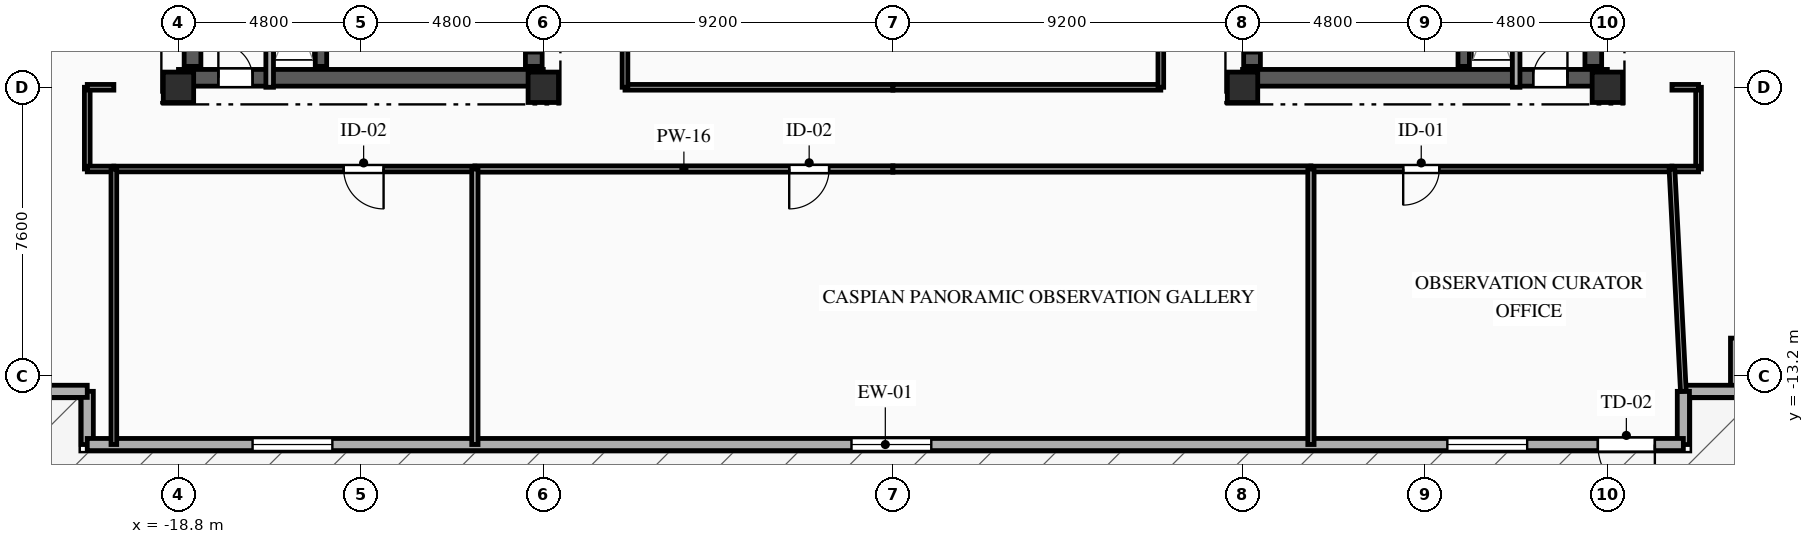
"""IFC4 building model, lengths in metres.
Left out: names, types, materials, properties, quantities, classifications, styles, units other than length and angle.
Written with IfcOpenShell. Run it as: python <this file> out.ifc"""

import sys

from ifc_helpers import new_model, si_unit, direction, frame, frame_2d, origin, origin_2d, place, context, subcontext, project, spatial, rectangle, extrude, element, fill, save


model = new_model("IFC4")
c1 = context("Model", 3, precision=1e-05, world=origin(), true_north=direction((0.0, 1.0)))
c2 = subcontext(c1, "Body", "Model", "MODEL_VIEW")
j1 = project(units=[si_unit("LENGTHUNIT", "METRE"), si_unit("PLANEANGLEUNIT", "RADIAN")], contexts=[c1])
p1 = place(None, origin())
s1 = spatial("IfcSite", under=j1, at=p1, CompositionType="ELEMENT")
p2 = place(p1, origin())
s2 = spatial("IfcBuilding", under=s1, at=p2, CompositionType="ELEMENT")
p3 = place(p2, frame((0.0, 0.0, 261.8)))
s3 = spatial("IfcBuildingStorey", under=s2, at=p3, CompositionType="ELEMENT", Elevation=261.8)
for number, where, z_axis, x_axis in (
    (1, (-18.8, -5.6, 0.0), (0.0, 0.0, 1.0), (1.0, 0.0, 0.0)),
    (2, (-9.2, -5.6, 0.0), (0.0, 0.0, 1.0), (1.0, 0.0, 0.0)),
    (3, (9.2, -5.6, 0.0), (0.0, 0.0, 1.0), (1.0, 0.0, 0.0)),
    (4, (18.8, -5.6, 0.0), (0.0, 0.0, 1.0), (1.0, 0.0, 0.0)),
):
    element("IfcColumn", number, at=place(p3, frame(where, z_axis=z_axis, x_axis=x_axis)), inside=s3, PredefinedType="COLUMN", context=c2, shape_type="SweptSolid", body=[
        extrude(rectangle(XDim=0.8, YDim=0.8, at=origin_2d()), origin(), (0.0, 0.0, 1.0), 4.2),
    ])
p4 = place(p3, frame((-21.2, -15.0, 0.0), z_axis=(0.0, 0.0, 1.0), x_axis=(0.0, 1.0, 0.0)))
e5 = element("IfcWall", 5, at=p4, inside=s3, PredefinedType="SOLIDWALL", context=c2, shape_type="SweptSolid", body=[
    extrude(rectangle(XDim=1.4, YDim=0.32, at=frame_2d((0.7, 0.0))), origin(), (0.0, 0.0, 1.0), 3.78),
])
for number, where, z_axis, x_axis in (
    (6, (-21.2, -13.6, 0.0), (0.0, 0.0, 1.0), (-1.0, 0.0, 0.0)),
    (7, (22.2, -12.2, 0.0), (0.0, 0.0, 1.0), (0.0, -1.0, 0.0)),
):
    element("IfcWall", number, at=place(p3, frame(where, z_axis=z_axis, x_axis=x_axis)), inside=s3, PredefinedType="SOLIDWALL", context=c2, shape_type="SweptSolid", body=[
        extrude(rectangle(XDim=1.4, YDim=0.32, at=frame_2d((0.7, 0.0))), origin(), (0.0, 0.0, 1.0), 3.78),
    ])
for number, where, z_axis, x_axis in (
    (8, (22.2, -13.6, 0.0), (0.0, 0.0, 1.0), (-1.0, 0.0, 0.0)),
    (9, (20.8, -13.6, 0.0), (0.0, 0.0, 1.0), (0.0, -1.0, 0.0)),
):
    element("IfcWall", number, at=place(p3, frame(where, z_axis=z_axis, x_axis=x_axis)), inside=s3, PredefinedType="SOLIDWALL", context=c2, shape_type="SweptSolid", body=[
        extrude(rectangle(XDim=1.4, YDim=0.32, at=frame_2d((0.7, 0.0))), origin(), (0.0, 0.0, 1.0), 3.78),
    ])
p5 = place(p3, frame((20.8, -15.0, 0.0), z_axis=(0.0, 0.0, 1.0), x_axis=(-1.0, 0.0, 0.0)))
e10 = element("IfcWall", 10, at=p5, inside=s3, PredefinedType="SOLIDWALL", context=c2, shape_type="SweptSolid", body=[
    extrude(rectangle(XDim=42.0, YDim=0.32, at=frame_2d((21.0, 0.0))), origin(), (0.0, 0.0, 1.0), 3.78),
])
p6 = place(p5, frame((0.75, 0.0, 0.0)))
e11 = element("IfcOpeningElement", 11, at=p6, cuts=e10, PredefinedType="OPENING", context=c2, shape_type="SweptSolid", body=[
    extrude(rectangle(XDim=1.5, YDim=2.2, at=frame_2d((0.75, 1.1))), frame((0.0, 0.17, 0.0), z_axis=(0.0, -1.0, 0.0), x_axis=(1.0, 0.0, 0.0)), (0.0, 0.0, 1.0), 0.34),
])
p7 = place(p5, frame((4.11, 0.0, 0.75)))
e12 = element("IfcOpeningElement", 12, at=p7, cuts=e10, PredefinedType="OPENING", context=c2, shape_type="SweptSolid", body=[
    extrude(rectangle(XDim=2.1, YDim=2.3, at=frame_2d((1.05, 1.15))), frame((0.0, 0.17, 0.0), z_axis=(0.0, -1.0, 0.0), x_axis=(1.0, 0.0, 0.0)), (0.0, 0.0, 1.0), 0.34),
])
p8 = place(p5, frame((19.79, 0.0, 0.75)))
e13 = element("IfcOpeningElement", 13, at=p8, cuts=e10, PredefinedType="OPENING", context=c2, shape_type="SweptSolid", body=[
    extrude(rectangle(XDim=2.1, YDim=2.3, at=frame_2d((1.05, 1.15))), frame((0.0, 0.17, 0.0), z_axis=(0.0, -1.0, 0.0), x_axis=(1.0, 0.0, 0.0)), (0.0, 0.0, 1.0), 0.34),
])
p9 = place(p5, frame((35.55, 0.0, 0.75)))
e14 = element("IfcOpeningElement", 14, at=p9, cuts=e10, PredefinedType="OPENING", context=c2, shape_type="SweptSolid", body=[
    extrude(rectangle(XDim=2.1, YDim=2.3, at=frame_2d((1.05, 1.15))), frame((0.0, 0.17, 0.0), z_axis=(0.0, -1.0, 0.0), x_axis=(1.0, 0.0, 0.0)), (0.0, 0.0, 1.0), 0.34),
])
p10 = place(p3, frame((-18.8, -5.35, 0.0), z_axis=(0.0, 0.0, 1.0), x_axis=(1.0, 0.0, 0.0)))
e15 = element("IfcWall", 15, at=p10, inside=s3, PredefinedType="SHEAR", context=c2, shape_type="SweptSolid", body=[
    extrude(rectangle(XDim=9.6, YDim=0.44, at=frame_2d((4.8, 0.0))), origin(), (0.0, 0.0, 1.0), 3.78),
])
p11 = place(p10, frame((1.05, 0.0, 0.0)))
e16 = element("IfcOpeningElement", 16, at=p11, cuts=e15, PredefinedType="OPENING", context=c2, shape_type="SweptSolid", body=[
    extrude(rectangle(XDim=0.9, YDim=2.1, at=frame_2d((0.45, 1.05))), frame((0.0, 0.23, 0.0), z_axis=(0.0, -1.0, 0.0), x_axis=(1.0, 0.0, 0.0)), (0.0, 0.0, 1.0), 0.46),
])
p12 = place(p3, frame((-18.43, -5.05, 0.0), z_axis=(0.0, 0.0, 1.0), x_axis=(0.0, 1.0, 0.0)))
e17 = element("IfcWall", 17, at=p12, inside=s3, PredefinedType="SHEAR", context=c2, shape_type="SweptSolid", body=[
    extrude(rectangle(XDim=10.1, YDim=0.44, at=frame_2d((5.05, 0.0))), origin(), (0.0, 0.0, 1.0), 3.78),
])
p13 = place(p3, frame((-9.45, -5.05, 0.0), z_axis=(0.0, 0.0, 1.0), x_axis=(0.0, 1.0, 0.0)))
e18 = element("IfcWall", 18, at=p13, inside=s3, PredefinedType="SHEAR", context=c2, shape_type="SweptSolid", body=[
    extrude(rectangle(XDim=10.1, YDim=0.44, at=frame_2d((5.05, 0.0))), origin(), (0.0, 0.0, 1.0), 3.78),
])
p14 = place(p13, frame((7.15, 0.0, 0.0)))
e19 = element("IfcOpeningElement", 19, at=p14, cuts=e18, PredefinedType="OPENING", context=c2, shape_type="SweptSolid", body=[
    extrude(rectangle(XDim=0.9, YDim=2.1, at=frame_2d((0.45, 1.05))), frame((0.0, 0.23, 0.0), z_axis=(0.0, -1.0, 0.0), x_axis=(1.0, 0.0, 0.0)), (0.0, 0.0, 1.0), 0.46),
])
p15 = place(p13, frame((2.4, 0.0, 0.0)))
e20 = element("IfcOpeningElement", 20, at=p15, cuts=e18, PredefinedType="OPENING", context=c2, shape_type="SweptSolid", body=[
    extrude(rectangle(XDim=1.2, YDim=2.15, at=frame_2d((0.6, 1.075))), frame((0.0, 0.23, 0.0), z_axis=(0.0, -1.0, 0.0), x_axis=(1.0, 0.0, 0.0)), (0.0, 0.0, 1.0), 0.46),
])
p16 = place(p13, frame((0.35, 0.0, 0.0)))
e21 = element("IfcOpeningElement", 21, at=p16, cuts=e18, PredefinedType="OPENING", context=c2, shape_type="SweptSolid", body=[
    extrude(rectangle(XDim=0.9, YDim=2.1, at=frame_2d((0.45, 1.05))), frame((0.0, 0.23, 0.0), z_axis=(0.0, -1.0, 0.0), x_axis=(1.0, 0.0, 0.0)), (0.0, 0.0, 1.0), 0.46),
])
p17 = place(p13, frame((5.0, 0.0, 0.0)))
e22 = element("IfcOpeningElement", 22, at=p17, cuts=e18, PredefinedType="OPENING", context=c2, shape_type="SweptSolid", body=[
    extrude(rectangle(XDim=0.9, YDim=2.1, at=frame_2d((0.45, 1.05))), frame((0.0, 0.23, 0.0), z_axis=(0.0, -1.0, 0.0), x_axis=(1.0, 0.0, 0.0)), (0.0, 0.0, 1.0), 0.46),
])
p18 = place(p3, frame((-15.05, -5.05, 0.0), z_axis=(0.0, 0.0, 1.0), x_axis=(0.0, 1.0, 0.0)))
e23 = element("IfcWall", 23, at=p18, inside=s3, PredefinedType="SHEAR", context=c2, shape_type="SweptSolid", body=[
    extrude(rectangle(XDim=10.1, YDim=0.3, at=frame_2d((5.05, 0.0))), origin(), (0.0, 0.0, 1.0), 3.78),
])
p19 = place(p3, frame((9.2, -5.35, 0.0), z_axis=(0.0, 0.0, 1.0), x_axis=(1.0, 0.0, 0.0)))
e24 = element("IfcWall", 24, at=p19, inside=s3, PredefinedType="SHEAR", context=c2, shape_type="SweptSolid", body=[
    extrude(rectangle(XDim=9.6, YDim=0.44, at=frame_2d((4.8, 0.0))), origin(), (0.0, 0.0, 1.0), 3.78),
])
p20 = place(p19, frame((7.65, 0.0, 0.0)))
e25 = element("IfcOpeningElement", 25, at=p20, cuts=e24, PredefinedType="OPENING", context=c2, shape_type="SweptSolid", body=[
    extrude(rectangle(XDim=0.9, YDim=2.1, at=frame_2d((0.45, 1.05))), frame((0.0, 0.23, 0.0), z_axis=(0.0, -1.0, 0.0), x_axis=(1.0, 0.0, 0.0)), (0.0, 0.0, 1.0), 0.46),
])
p21 = place(p3, frame((9.45, -5.05, 0.0), z_axis=(0.0, 0.0, 1.0), x_axis=(0.0, 1.0, 0.0)))
e26 = element("IfcWall", 26, at=p21, inside=s3, PredefinedType="SHEAR", context=c2, shape_type="SweptSolid", body=[
    extrude(rectangle(XDim=10.1, YDim=0.44, at=frame_2d((5.05, 0.0))), origin(), (0.0, 0.0, 1.0), 3.78),
])
p22 = place(p21, frame((7.15, 0.0, 0.0)))
e27 = element("IfcOpeningElement", 27, at=p22, cuts=e26, PredefinedType="OPENING", context=c2, shape_type="SweptSolid", body=[
    extrude(rectangle(XDim=0.9, YDim=2.1, at=frame_2d((0.45, 1.05))), frame((0.0, 0.23, 0.0), z_axis=(0.0, -1.0, 0.0), x_axis=(1.0, 0.0, 0.0)), (0.0, 0.0, 1.0), 0.46),
])
p23 = place(p21, frame((2.4, 0.0, 0.0)))
e28 = element("IfcOpeningElement", 28, at=p23, cuts=e26, PredefinedType="OPENING", context=c2, shape_type="SweptSolid", body=[
    extrude(rectangle(XDim=1.2, YDim=2.15, at=frame_2d((0.6, 1.075))), frame((0.0, 0.23, 0.0), z_axis=(0.0, -1.0, 0.0), x_axis=(1.0, 0.0, 0.0)), (0.0, 0.0, 1.0), 0.46),
])
p24 = place(p21, frame((0.35, 0.0, 0.0)))
e29 = element("IfcOpeningElement", 29, at=p24, cuts=e26, PredefinedType="OPENING", context=c2, shape_type="SweptSolid", body=[
    extrude(rectangle(XDim=0.9, YDim=2.1, at=frame_2d((0.45, 1.05))), frame((0.0, 0.23, 0.0), z_axis=(0.0, -1.0, 0.0), x_axis=(1.0, 0.0, 0.0)), (0.0, 0.0, 1.0), 0.46),
])
p25 = place(p3, frame((18.43, -5.05, 0.0), z_axis=(0.0, 0.0, 1.0), x_axis=(0.0, 1.0, 0.0)))
e30 = element("IfcWall", 30, at=p25, inside=s3, PredefinedType="SHEAR", context=c2, shape_type="SweptSolid", body=[
    extrude(rectangle(XDim=10.1, YDim=0.44, at=frame_2d((5.05, 0.0))), origin(), (0.0, 0.0, 1.0), 3.78),
])
p26 = place(p3, frame((15.02, -5.05, 0.0), z_axis=(0.0, 0.0, 1.0), x_axis=(0.0, 1.0, 0.0)))
e31 = element("IfcWall", 31, at=p26, inside=s3, PredefinedType="SHEAR", context=c2, shape_type="SweptSolid", body=[
    extrude(rectangle(XDim=10.1, YDim=0.3, at=frame_2d((5.05, 0.0))), origin(), (0.0, 0.0, 1.0), 3.78),
])
for number, where, z_axis, x_axis in (
    (32, (-16.4, -5.6, 0.0), (0.0, 0.0, 1.0), (0.0, 1.0, 0.0)),
    (33, (16.4, -2.11, 0.0), (0.0, 0.0, 1.0), (0.0, -1.0, 0.0)),
):
    element("IfcWall", number, at=place(p3, frame(where, z_axis=z_axis, x_axis=x_axis)), inside=s3, PredefinedType="PARTITIONING", context=c2, shape_type="SweptSolid", body=[
        extrude(rectangle(XDim=3.49, YDim=0.2, at=frame_2d((1.745, 0.0))), origin(), (0.0, 0.0, 1.0), 3.78),
    ])
p27 = place(p3, frame((0.0, -7.75, 0.0), z_axis=(0.0, 0.0, 1.0), x_axis=(-1.0, 0.0, 0.0)))
e34 = element("IfcWall", 34, at=p27, inside=s3, PredefinedType="PARTITIONING", context=c2, shape_type="SweptSolid", body=[
    extrude(rectangle(XDim=11.0, YDim=0.165, at=frame_2d((5.5, 0.0))), origin(), (0.0, 0.0, 1.0), 3.78),
])
p28 = place(p27, frame((1.679, 0.0, 0.0)))
e35 = element("IfcOpeningElement", 35, at=p28, cuts=e34, PredefinedType="OPENING", context=c2, shape_type="SweptSolid", body=[
    extrude(rectangle(XDim=1.05, YDim=2.15, at=frame_2d((0.525, 1.075))), frame((0.0, 0.093, 0.0), z_axis=(0.0, -1.0, 0.0), x_axis=(1.0, 0.0, 0.0)), (0.0, 0.0, 1.0), 0.185),
])
p29 = place(p3, frame((-11.0, -7.75, 0.0), z_axis=(0.0, 0.0, 1.0), x_axis=(-1.0, 0.0, 0.0)))
e36 = element("IfcWall", 36, at=p29, inside=s3, PredefinedType="PARTITIONING", context=c2, shape_type="SweptSolid", body=[
    extrude(rectangle(XDim=9.5, YDim=0.15, at=frame_2d((4.75, 0.0))), origin(), (0.0, 0.0, 1.0), 3.78),
])
p30 = place(p29, frame((2.403, 0.0, 0.0)))
e37 = element("IfcOpeningElement", 37, at=p30, cuts=e36, PredefinedType="OPENING", context=c2, shape_type="SweptSolid", body=[
    extrude(rectangle(XDim=1.05, YDim=2.15, at=frame_2d((0.525, 1.075))), frame((0.0, 0.085, 0.0), z_axis=(0.0, -1.0, 0.0), x_axis=(1.0, 0.0, 0.0)), (0.0, 0.0, 1.0), 0.17),
])
p31 = place(p3, frame((-21.2, -7.75, 0.0), z_axis=(0.0, 0.0, 1.0), x_axis=(0.0, 1.0, 0.0)))
e38 = element("IfcWall", 38, at=p31, inside=s3, PredefinedType="PARTITIONING", context=c2, shape_type="SweptSolid", body=[
    extrude(rectangle(XDim=2.15, YDim=0.15, at=frame_2d((1.075, 0.0))), origin(), (0.0, 0.0, 1.0), 3.435),
])
for number, where, z_axis, x_axis in (
    (39, (-20.5, -7.75, 0.0), (0.0, 0.0, 1.0), (-1.0, 0.0, 0.0)),
    (40, (-21.2, -5.6, 0.0), (0.0, 0.0, 1.0), (1.0, 0.0, 0.0)),
):
    element("IfcWall", number, at=place(p3, frame(where, z_axis=z_axis, x_axis=x_axis)), inside=s3, PredefinedType="PARTITIONING", context=c2, shape_type="SweptSolid", body=[
        extrude(rectangle(XDim=0.7, YDim=0.15, at=frame_2d((0.35, 0.0))), origin(), (0.0, 0.0, 1.0), 3.78),
    ])
p32 = place(p3, frame((-7.05, -5.6, 0.0), z_axis=(0.0, 0.0, 1.0), x_axis=(1.0, 0.0, 0.0)))
e41 = element("IfcWall", 41, at=p32, inside=s3, PredefinedType="PARTITIONING", context=c2, shape_type="SweptSolid", body=[
    extrude(rectangle(XDim=7.05, YDim=0.15, at=frame_2d((3.525, 0.0))), origin(), (0.0, 0.0, 1.0), 3.265),
])
p33 = place(p3, frame((11.0, -7.75, 0.0), z_axis=(0.0, 0.0, 1.0), x_axis=(-1.0, 0.0, 0.0)))
e42 = element("IfcWall", 42, at=p33, inside=s3, PredefinedType="PARTITIONING", context=c2, shape_type="SweptSolid", body=[
    extrude(rectangle(XDim=11.0, YDim=0.165, at=frame_2d((5.5, 0.0))), origin(), (0.0, 0.0, 1.0), 3.78),
])
p34 = place(p3, frame((20.5, -7.75, 0.0), z_axis=(0.0, 0.0, 1.0), x_axis=(-1.0, 0.0, 0.0)))
e43 = element("IfcWall", 43, at=p34, inside=s3, PredefinedType="PARTITIONING", context=c2, shape_type="SweptSolid", body=[
    extrude(rectangle(XDim=9.5, YDim=0.15, at=frame_2d((4.75, 0.0))), origin(), (0.0, 0.0, 1.0), 3.78),
])
p35 = place(p34, frame((6.123, 0.0, 0.0)))
e44 = element("IfcOpeningElement", 44, at=p35, cuts=e43, PredefinedType="OPENING", context=c2, shape_type="SweptSolid", body=[
    extrude(rectangle(XDim=0.95, YDim=2.1, at=frame_2d((0.475, 1.05))), frame((0.0, 0.085, 0.0), z_axis=(0.0, -1.0, 0.0), x_axis=(1.0, 0.0, 0.0)), (0.0, 0.0, 1.0), 0.17),
])
p36 = place(p3, frame((21.2, -5.6, 0.0), z_axis=(0.0, 0.0, 1.0), x_axis=(0.0, -1.0, 0.0)))
e45 = element("IfcWall", 45, at=p36, inside=s3, PredefinedType="PARTITIONING", context=c2, shape_type="SweptSolid", body=[
    extrude(rectangle(XDim=2.15, YDim=0.15, at=frame_2d((1.075, 0.0))), origin(), (0.0, 0.0, 1.0), 3.78),
])
for number, where, z_axis, x_axis in (
    (46, (20.5, -5.6, 0.0), (0.0, 0.0, 1.0), (1.0, 0.0, 0.0)),
    (47, (21.2, -7.75, 0.0), (0.0, 0.0, 1.0), (-1.0, 0.0, 0.0)),
):
    element("IfcWall", number, at=place(p3, frame(where, z_axis=z_axis, x_axis=x_axis)), inside=s3, PredefinedType="PARTITIONING", context=c2, shape_type="SweptSolid", body=[
        extrude(rectangle(XDim=0.7, YDim=0.15, at=frame_2d((0.35, 0.0))), origin(), (0.0, 0.0, 1.0), 3.78),
    ])
p37 = place(p3, frame((0.0, -5.6, 0.0), z_axis=(0.0, 0.0, 1.0), x_axis=(1.0, 0.0, 0.0)))
e48 = element("IfcWall", 48, at=p37, inside=s3, PredefinedType="PARTITIONING", context=c2, shape_type="SweptSolid", body=[
    extrude(rectangle(XDim=7.05, YDim=0.15, at=frame_2d((3.525, 0.0))), origin(), (0.0, 0.0, 1.0), 3.265),
])
p38 = place(p3, frame((-7.05, 8.5, 0.0), z_axis=(0.0, 0.0, 1.0), x_axis=(0.0, -1.0, 0.0)))
e49 = element("IfcWall", 49, at=p38, inside=s3, PredefinedType="PARTITIONING", context=c2, shape_type="SweptSolid", body=[
    extrude(rectangle(XDim=14.1, YDim=0.15, at=frame_2d((7.05, 0.0))), origin(), (0.0, 0.0, 1.0), 3.78),
])
p39 = place(p38, frame((8.074, 0.0, 0.0)))
e50 = element("IfcOpeningElement", 50, at=p39, cuts=e49, PredefinedType="OPENING", context=c2, shape_type="SweptSolid", body=[
    extrude(rectangle(XDim=0.95, YDim=2.1, at=frame_2d((0.475, 1.05))), frame((0.0, 0.085, 0.0), z_axis=(0.0, -1.0, 0.0), x_axis=(1.0, 0.0, 0.0)), (0.0, 0.0, 1.0), 0.17),
])
p40 = place(p3, frame((7.05, -5.6, 0.0), z_axis=(0.0, 0.0, 1.0), x_axis=(0.0, 1.0, 0.0)))
e51 = element("IfcWall", 51, at=p40, inside=s3, PredefinedType="PARTITIONING", context=c2, shape_type="SweptSolid", body=[
    extrude(rectangle(XDim=14.1, YDim=0.15, at=frame_2d((7.05, 0.0))), origin(), (0.0, 0.0, 1.0), 3.78),
])
for number, where, z_axis, x_axis in (
    (52, (-11.0, -15.0, 0.0), (0.0, 0.0, 1.0), (0.0, 1.0, 0.0)),
    (53, (11.0, -7.75, 0.0), (0.0, 0.0, 1.0), (0.0, -1.0, 0.0)),
):
    element("IfcWall", number, at=place(p3, frame(where, z_axis=z_axis, x_axis=x_axis)), inside=s3, PredefinedType="PARTITIONING", context=c2, shape_type="SweptSolid", body=[
        extrude(rectangle(XDim=7.25, YDim=0.165, at=frame_2d((3.625, 0.0))), origin(), (0.0, 0.0, 1.0), 3.78),
    ])
p41 = place(p3, frame((-20.5, -15.0, 0.0), z_axis=(0.0, 0.0, 1.0), x_axis=(0.0, 1.0, 0.0)))
e54 = element("IfcWall", 54, at=p41, inside=s3, PredefinedType="PARTITIONING", context=c2, shape_type="SweptSolid", body=[
    extrude(rectangle(XDim=7.25, YDim=0.15, at=frame_2d((3.625, 0.0))), origin(), (0.0, 0.0, 1.0), 3.78),
])
p42 = place(p3, frame((20.5, -7.75, 0.0), z_axis=(0.0, 0.0, 1.0), x_axis=(0.05122221301, -0.998687280831, 0.0)))
e55 = element("IfcWall", 55, at=p42, inside=s3, PredefinedType="PARTITIONING", context=c2, shape_type="SweptSolid", body=[
    extrude(rectangle(XDim=5.858, YDim=0.15, at=frame_2d((2.929, 0.0))), origin(), (0.0, 0.0, 1.0), 3.78),
])
p43 = place(p6, origin())
e56 = element("IfcDoor", 56, at=p43, inside=s3, OperationType="SINGLE_SWING_LEFT", PredefinedType="DOOR", context=c2, shape_type="SweptSolid", body=[
    extrude(rectangle(XDim=1.5, YDim=2.2, at=frame_2d((0.75, 1.1))), frame((0.0, 0.025, 0.0), z_axis=(0.0, -1.0, 0.0), x_axis=(1.0, 0.0, 0.0)), (0.0, 0.0, 1.0), 0.05),
])
fill(e11, e56)
p44 = place(p7, origin())
e57 = element("IfcWindow", 57, at=p44, inside=s3, PartitioningType="SINGLE_PANEL", PredefinedType="WINDOW", context=c2, shape_type="SweptSolid", body=[
    extrude(rectangle(XDim=2.1, YDim=2.3, at=frame_2d((1.05, 1.15))), frame((0.0, 0.03, 0.0), z_axis=(0.0, -1.0, 0.0), x_axis=(1.0, 0.0, 0.0)), (0.0, 0.0, 1.0), 0.06),
])
fill(e12, e57)
p45 = place(p8, origin())
e58 = element("IfcWindow", 58, at=p45, inside=s3, PartitioningType="SINGLE_PANEL", PredefinedType="WINDOW", context=c2, shape_type="SweptSolid", body=[
    extrude(rectangle(XDim=2.1, YDim=2.3, at=frame_2d((1.05, 1.15))), frame((0.0, 0.03, 0.0), z_axis=(0.0, -1.0, 0.0), x_axis=(1.0, 0.0, 0.0)), (0.0, 0.0, 1.0), 0.06),
])
fill(e13, e58)
p46 = place(p9, origin())
e59 = element("IfcWindow", 59, at=p46, inside=s3, PartitioningType="SINGLE_PANEL", PredefinedType="WINDOW", context=c2, shape_type="SweptSolid", body=[
    extrude(rectangle(XDim=2.1, YDim=2.3, at=frame_2d((1.05, 1.15))), frame((0.0, 0.03, 0.0), z_axis=(0.0, -1.0, 0.0), x_axis=(1.0, 0.0, 0.0)), (0.0, 0.0, 1.0), 0.06),
])
fill(e14, e59)
p47 = place(p11, origin())
e60 = element("IfcDoor", 60, at=p47, inside=s3, OperationType="SINGLE_SWING_LEFT", PredefinedType="DOOR", context=c2, shape_type="SweptSolid", body=[
    extrude(rectangle(XDim=0.9, YDim=2.1, at=frame_2d((0.45, 1.05))), frame((0.0, 0.025, 0.0), z_axis=(0.0, -1.0, 0.0), x_axis=(1.0, 0.0, 0.0)), (0.0, 0.0, 1.0), 0.05),
])
fill(e16, e60)
p48 = place(p20, origin())
e61 = element("IfcDoor", 61, at=p48, inside=s3, OperationType="SINGLE_SWING_RIGHT", PredefinedType="DOOR", context=c2, shape_type="SweptSolid", body=[
    extrude(rectangle(XDim=0.9, YDim=2.1, at=frame_2d((0.45, 1.05))), frame((0.0, 0.025, 0.0), z_axis=(0.0, -1.0, 0.0), x_axis=(1.0, 0.0, 0.0)), (0.0, 0.0, 1.0), 0.05),
])
fill(e25, e61)
p49 = place(p16, origin())
e62 = element("IfcDoor", 62, at=p49, inside=s3, OperationType="SINGLE_SWING_RIGHT", PredefinedType="DOOR", context=c2, shape_type="SweptSolid", body=[
    extrude(rectangle(XDim=0.9, YDim=2.1, at=frame_2d((0.45, 1.05))), frame((0.0, 0.025, 0.0), z_axis=(0.0, -1.0, 0.0), x_axis=(1.0, 0.0, 0.0)), (0.0, 0.0, 1.0), 0.05),
])
fill(e21, e62)
p50 = place(p24, origin())
e63 = element("IfcDoor", 63, at=p50, inside=s3, OperationType="SINGLE_SWING_RIGHT", PredefinedType="DOOR", context=c2, shape_type="SweptSolid", body=[
    extrude(rectangle(XDim=0.9, YDim=2.1, at=frame_2d((0.45, 1.05))), frame((0.0, 0.025, 0.0), z_axis=(0.0, -1.0, 0.0), x_axis=(1.0, 0.0, 0.0)), (0.0, 0.0, 1.0), 0.05),
])
fill(e29, e63)
p51 = place(p28, origin())
e64 = element("IfcDoor", 64, at=p51, inside=s3, OperationType="SINGLE_SWING_RIGHT", PredefinedType="DOOR", context=c2, shape_type="SweptSolid", body=[
    extrude(rectangle(XDim=1.05, YDim=2.15, at=frame_2d((0.525, 1.075))), frame((0.0, 0.025, 0.0), z_axis=(0.0, -1.0, 0.0), x_axis=(1.0, 0.0, 0.0)), (0.0, 0.0, 1.0), 0.05),
])
fill(e35, e64)
p52 = place(p30, origin())
e65 = element("IfcDoor", 65, at=p52, inside=s3, OperationType="SINGLE_SWING_LEFT", PredefinedType="DOOR", context=c2, shape_type="SweptSolid", body=[
    extrude(rectangle(XDim=1.05, YDim=2.15, at=frame_2d((0.525, 1.075))), frame((0.0, 0.025, 0.0), z_axis=(0.0, -1.0, 0.0), x_axis=(1.0, 0.0, 0.0)), (0.0, 0.0, 1.0), 0.05),
])
fill(e37, e65)
p53 = place(p35, origin())
e66 = element("IfcDoor", 66, at=p53, inside=s3, OperationType="SINGLE_SWING_RIGHT", PredefinedType="DOOR", context=c2, shape_type="SweptSolid", body=[
    extrude(rectangle(XDim=0.95, YDim=2.1, at=frame_2d((0.475, 1.05))), frame((0.0, 0.025, 0.0), z_axis=(0.0, -1.0, 0.0), x_axis=(1.0, 0.0, 0.0)), (0.0, 0.0, 1.0), 0.05),
])
fill(e44, e66)
save(model, sys.argv[1])
